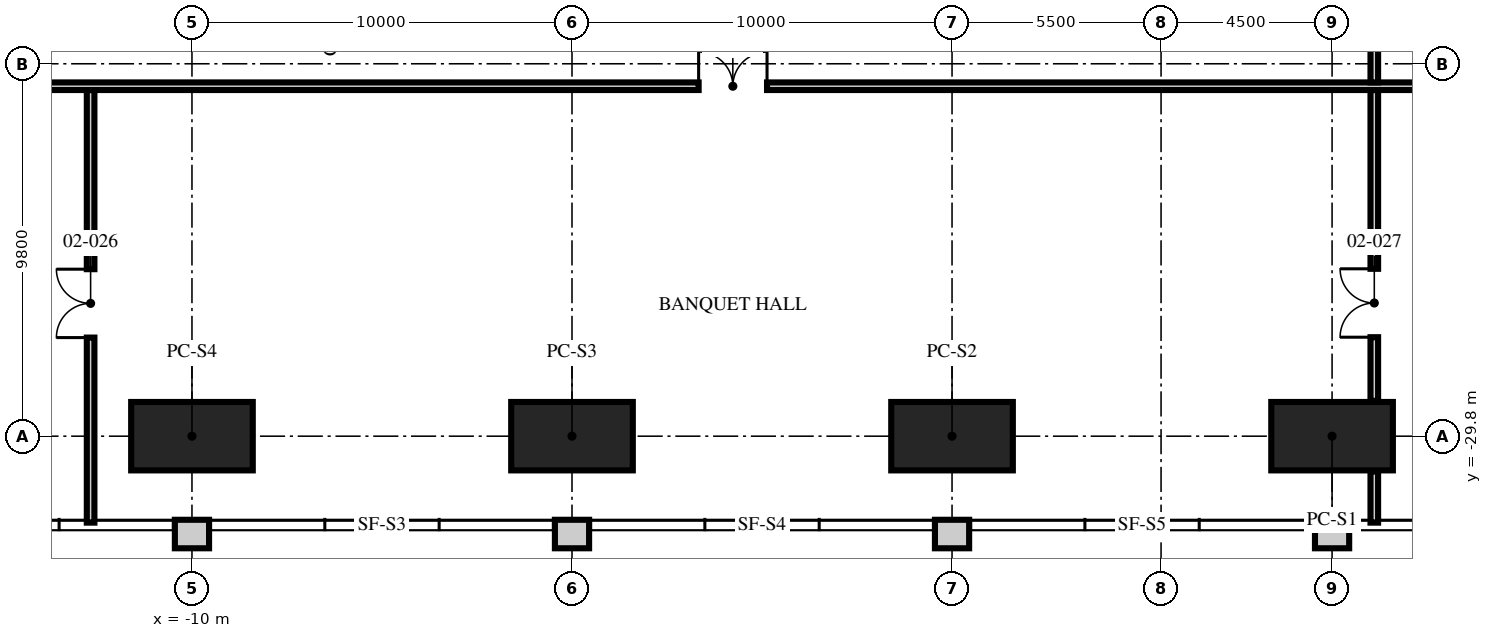
"""IFC4 building model, lengths in metres.
Left out: names, types, materials, properties, quantities, classifications, styles, units other than length and angle.
Written with IfcOpenShell. Run it as: python <this file> out.ifc"""

import sys

from ifc_helpers import new_model, si_unit, direction, frame, frame_2d, origin, origin_2d, place, context, subcontext, project, spatial, rectangle, hollow_rectangle, extrude, element, fill, save


model = new_model("IFC4")
c1 = context("Model", 3, precision=1e-05, world=origin(), true_north=direction((0.0, 1.0)))
c2 = subcontext(c1, "Body", "Model", "MODEL_VIEW")
j1 = project(units=[si_unit("LENGTHUNIT", "METRE"), si_unit("PLANEANGLEUNIT", "RADIAN")], contexts=[c1])
p1 = place(None, origin())
s1 = spatial("IfcSite", under=j1, at=p1, CompositionType="ELEMENT")
p2 = place(p1, origin())
s2 = spatial("IfcBuilding", under=s1, at=p2, CompositionType="ELEMENT")
p3 = place(p2, frame((0.0, 0.0, 11.0)))
s3 = spatial("IfcBuildingStorey", under=s2, at=p3, CompositionType="ELEMENT", Elevation=11.0)
for number, where, z_axis, x_axis in (
    (1, (20.0, -29.8, 0.0), (0.0, 0.0, 1.0), (1.0, 0.0, 0.0)),
    (2, (10.0, -29.8, 0.0), (0.0, 0.0, 1.0), (1.0, 0.0, 0.0)),
    (3, (0.0, -29.8, 0.0), (0.0, 0.0, 1.0), (1.0, 0.0, 0.0)),
    (4, (-10.0, -29.8, 0.0), (0.0, 0.0, 1.0), (1.0, 0.0, 0.0)),
):
    element("IfcColumn", number, at=place(p3, frame(where, z_axis=z_axis, x_axis=x_axis)), inside=s3, PredefinedType="COLUMN", context=c2, shape_type="SweptSolid", body=[
        extrude(hollow_rectangle(XDim=3.2, YDim=1.8, WallThickness=0.2, at=origin_2d()), origin(), (0.0, 0.0, 1.0), 5.0),
    ])
for number, where, z_axis, x_axis in (
    (5, (-10.45, -32.375, 0.0), (0.0, 0.0, 1.0), (1.0, 0.0, 0.0)),
    (6, (-0.45, -32.375, 0.0), (0.0, 0.0, 1.0), (1.0, 0.0, 0.0)),
    (7, (9.55, -32.375, 0.0), (0.0, 0.0, 1.0), (1.0, 0.0, 0.0)),
    (8, (19.55, -32.375, 0.0), (0.0, 0.0, 1.0), (1.0, 0.0, 0.0)),
):
    element("IfcWall", number, at=place(p3, frame(where, z_axis=z_axis, x_axis=x_axis)), inside=s3, PredefinedType="SOLIDWALL", context=c2, shape_type="SweptSolid", body=[
        extrude(rectangle(XDim=0.9, YDim=0.75, at=frame_2d((0.45, 0.0))), origin(), (0.0, 0.0, 1.0), 5.0),
    ])
p4 = place(p3, frame((-12.667, -32.075, 0.0), z_axis=(0.0, 0.0, 1.0), x_axis=(0.0, 1.0, 0.0)))
e9 = element("IfcWall", 9, at=p4, inside=s3, PredefinedType="SOLIDWALL", context=c2, shape_type="SweptSolid", body=[
    extrude(rectangle(XDim=11.384, YDim=0.2, at=frame_2d((5.692, 0.0))), origin(), (0.0, 0.0, 1.0), 3.7),
])
p5 = place(p4, frame((4.869, 0.0, 0.0)))
e10 = element("IfcOpeningElement", 10, at=p5, cuts=e9, PredefinedType="OPENING", context=c2, shape_type="SweptSolid", body=[
    extrude(rectangle(XDim=1.8, YDim=2.4, at=frame_2d((0.9, 1.2))), frame((0.0, 0.11, 0.0), z_axis=(0.0, -1.0, 0.0), x_axis=(1.0, 0.0, 0.0)), (0.0, 0.0, 1.0), 0.22),
])
p6 = place(p3, frame((21.111, -32.075, 0.0), z_axis=(0.0, 0.0, 1.0), x_axis=(0.0, 1.0, 0.0)))
e11 = element("IfcWall", 11, at=p6, inside=s3, PredefinedType="SOLIDWALL", context=c2, shape_type="SweptSolid", body=[
    extrude(rectangle(XDim=1.345, YDim=0.2, at=frame_2d((0.672, 0.0))), origin(), (0.0, 0.0, 1.0), 4.7),
])
p7 = place(p3, frame((21.111, -28.87, 0.0), z_axis=(0.0, 0.0, 1.0), x_axis=(0.0, 1.0, 0.0)))
e12 = element("IfcWall", 12, at=p7, inside=s3, PredefinedType="SOLIDWALL", context=c2, shape_type="SweptSolid", body=[
    extrude(rectangle(XDim=8.179, YDim=0.2, at=frame_2d((4.089, 0.0))), origin(), (0.0, 0.0, 1.0), 3.5),
])
p8 = place(p7, frame((1.674, 0.0, 0.0)))
e13 = element("IfcOpeningElement", 13, at=p8, cuts=e12, PredefinedType="OPENING", context=c2, shape_type="SweptSolid", body=[
    extrude(rectangle(XDim=1.8, YDim=2.4, at=frame_2d((0.9, 1.2))), frame((0.0, 0.11, 0.0), z_axis=(0.0, -1.0, 0.0), x_axis=(1.0, 0.0, 0.0)), (0.0, 0.0, 1.0), 0.22),
])
p9 = place(p3, frame((-28.87, -20.591, 0.0), z_axis=(0.0, 0.0, 1.0), x_axis=(1.0, 0.0, 0.0)))
e14 = element("IfcWall", 14, at=p9, inside=s3, PredefinedType="SOLIDWALL", context=c2, shape_type="SweptSolid", body=[
    extrude(rectangle(XDim=57.74, YDim=0.2, at=frame_2d((28.87, 0.0))), origin(), (0.0, 0.0, 1.0), 3.5),
])
p10 = place(p9, frame((11.091, 0.0, 0.0)))
e15 = element("IfcOpeningElement", 15, at=p10, cuts=e14, PredefinedType="OPENING", context=c2, shape_type="SweptSolid", body=[
    extrude(rectangle(XDim=1.8, YDim=2.4, at=frame_2d((0.9, 1.2))), frame((0.0, 0.11, 0.0), z_axis=(0.0, -1.0, 0.0), x_axis=(1.0, 0.0, 0.0)), (0.0, 0.0, 1.0), 0.22),
])
p11 = place(p9, frame((32.202, 0.0, 0.0)))
e16 = element("IfcOpeningElement", 16, at=p11, cuts=e14, PredefinedType="OPENING", context=c2, shape_type="SweptSolid", body=[
    extrude(rectangle(XDim=1.8, YDim=2.4, at=frame_2d((0.9, 1.2))), frame((0.0, 0.11, 0.0), z_axis=(0.0, -1.0, 0.0), x_axis=(1.0, 0.0, 0.0)), (0.0, 0.0, 1.0), 0.22),
])
p12 = place(p3, frame((21.111, -20.491, 0.0), z_axis=(0.0, 0.0, 1.0), x_axis=(0.0, 1.0, 0.0)))
e17 = element("IfcWall", 17, at=p12, inside=s3, PredefinedType="SOLIDWALL", context=c2, shape_type="SweptSolid", body=[
    extrude(rectangle(XDim=42.022, YDim=0.2, at=frame_2d((21.011, 0.0))), origin(), (0.0, 0.0, 1.0), 3.5),
])
p13 = place(p12, frame((4.88, 0.0, 0.0)))
e18 = element("IfcOpeningElement", 18, at=p13, cuts=e17, PredefinedType="OPENING", context=c2, shape_type="SweptSolid", body=[
    extrude(rectangle(XDim=1.0, YDim=2.1, at=frame_2d((0.5, 1.05))), frame((0.0, 0.11, 0.0), z_axis=(0.0, -1.0, 0.0), x_axis=(1.0, 0.0, 0.0)), (0.0, 0.0, 1.0), 0.22),
])
p14 = place(p12, frame((16.064, 0.0, 0.0)))
e19 = element("IfcOpeningElement", 19, at=p14, cuts=e17, PredefinedType="OPENING", context=c2, shape_type="SweptSolid", body=[
    extrude(rectangle(XDim=1.0, YDim=2.1, at=frame_2d((0.5, 1.05))), frame((0.0, 0.11, 0.0), z_axis=(0.0, -1.0, 0.0), x_axis=(1.0, 0.0, 0.0)), (0.0, 0.0, 1.0), 0.22),
])
p15 = place(p12, frame((31.696, 0.0, 0.0)))
e20 = element("IfcOpeningElement", 20, at=p15, cuts=e17, PredefinedType="OPENING", context=c2, shape_type="SweptSolid", body=[
    extrude(rectangle(XDim=1.0, YDim=2.1, at=frame_2d((0.5, 1.05))), frame((0.0, 0.11, 0.0), z_axis=(0.0, -1.0, 0.0), x_axis=(1.0, 0.0, 0.0)), (0.0, 0.0, 1.0), 0.22),
])
p16 = place(p11, origin())
e21 = element("IfcDoor", 21, at=p16, inside=s3, OperationType="DOUBLE_DOOR_SINGLE_SWING", PredefinedType="DOOR", context=c2, shape_type="SweptSolid", body=[
    extrude(rectangle(XDim=1.8, YDim=2.4, at=frame_2d((0.9, 1.2))), frame((0.0, 0.025, 0.0), z_axis=(0.0, -1.0, 0.0), x_axis=(1.0, 0.0, 0.0)), (0.0, 0.0, 1.0), 0.05),
])
fill(e16, e21)
p17 = place(p5, origin())
e22 = element("IfcDoor", 22, at=p17, inside=s3, OperationType="DOUBLE_DOOR_SINGLE_SWING", PredefinedType="DOOR", context=c2, shape_type="SweptSolid", body=[
    extrude(rectangle(XDim=1.8, YDim=2.4, at=frame_2d((0.9, 1.2))), frame((0.0, 0.025, 0.0), z_axis=(0.0, -1.0, 0.0), x_axis=(1.0, 0.0, 0.0)), (0.0, 0.0, 1.0), 0.05),
])
fill(e10, e22)
p18 = place(p8, origin())
e23 = element("IfcDoor", 23, at=p18, inside=s3, OperationType="DOUBLE_DOOR_SINGLE_SWING", PredefinedType="DOOR", context=c2, shape_type="SweptSolid", body=[
    extrude(rectangle(XDim=1.8, YDim=2.4, at=frame_2d((0.9, 1.2))), frame((0.0, 0.025, 0.0), z_axis=(0.0, -1.0, 0.0), x_axis=(1.0, 0.0, 0.0)), (0.0, 0.0, 1.0), 0.05),
])
fill(e13, e23)
save(model, sys.argv[1])
